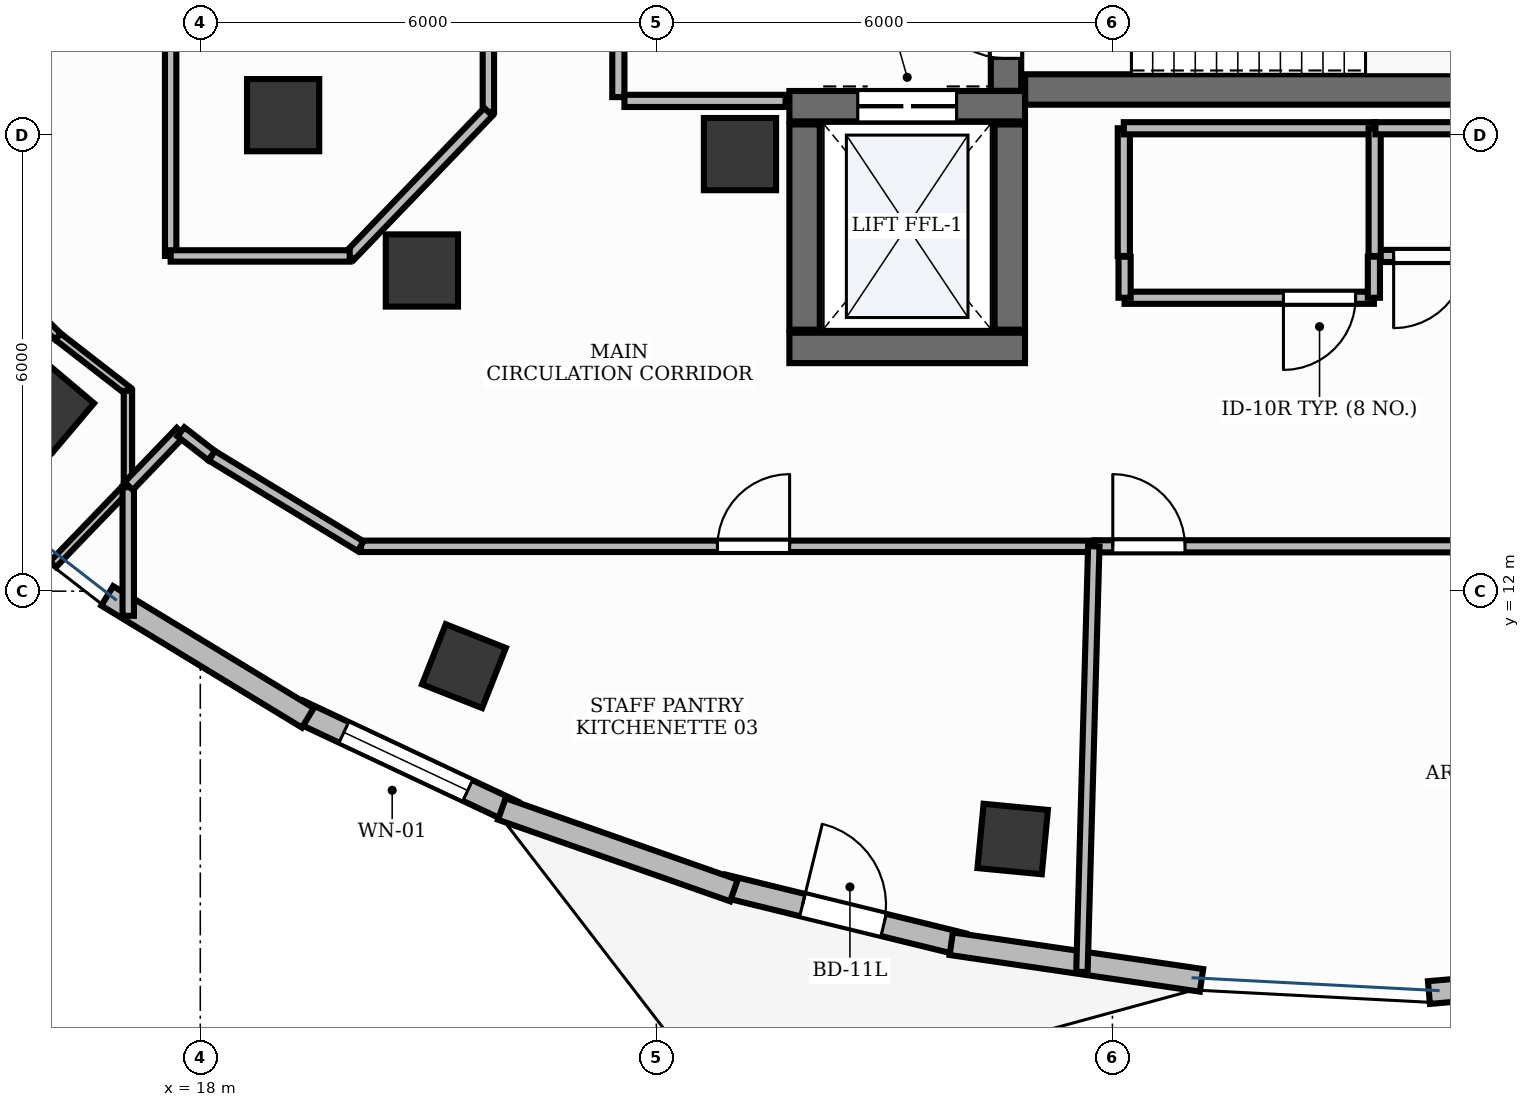
"""IFC4 building model, lengths in metres.
Left out: names, types, materials, properties, quantities, classifications, styles, units other than length and angle.
Written with IfcOpenShell. Run it as: python <this file> out.ifc"""

import sys

from ifc_helpers import new_model, si_unit, direction, frame, frame_2d, origin, origin_2d, place, context, subcontext, project, spatial, rectangle, extrude, element, fill, save


model = new_model("IFC4")
c1 = context("Model", 3, precision=1e-05, world=origin(), true_north=direction((0.0, 1.0)))
c2 = subcontext(c1, "Body", "Model", "MODEL_VIEW")
j1 = project(units=[si_unit("LENGTHUNIT", "METRE"), si_unit("PLANEANGLEUNIT", "RADIAN")], contexts=[c1])
p1 = place(None, origin())
s1 = spatial("IfcSite", under=j1, at=p1, CompositionType="ELEMENT")
p2 = place(p1, origin())
s2 = spatial("IfcBuilding", under=s1, at=p2, CompositionType="ELEMENT")
p3 = place(p2, frame((0.0, 0.0, 264.6)))
s3 = spatial("IfcBuildingStorey", under=s2, at=p3, CompositionType="ELEMENT", Elevation=264.6)
p4 = place(p3, frame((28.852, 18.6, 0.0), z_axis=(0.0, 0.0, 1.0), x_axis=(1.0, 0.0, 0.0)))
e1 = element("IfcWall", 1, at=p4, inside=s3, PredefinedType="SHEAR", context=c2, shape_type="SweptSolid", body=[
    extrude(rectangle(XDim=8.198, YDim=0.4, at=frame_2d((4.099, 0.0))), origin(), (0.0, 0.0, 1.0), 3.9),
])
p5 = place(p3, frame((28.6, 18.582, 0.0), z_axis=(0.0, 0.0, 1.0), x_axis=(0.0, 1.0, 0.0)))
e2 = element("IfcWall", 2, at=p5, inside=s3, PredefinedType="SHEAR", context=c2, shape_type="SweptSolid", body=[
    extrude(rectangle(XDim=3.308, YDim=0.4, at=frame_2d((1.654, 0.0))), origin(), (0.0, 0.0, 1.0), 3.9),
])
p6 = place(p5, frame((0.428, 0.0, 0.0)))
e3 = element("IfcOpeningElement", 3, at=p6, cuts=e2, PredefinedType="OPENING", context=c2, shape_type="SweptSolid", body=[
    extrude(rectangle(XDim=1.05, YDim=2.15, at=frame_2d((0.525, 1.075))), frame((0.0, 0.215, 0.0), z_axis=(0.0, -1.0, 0.0), x_axis=(1.0, 0.0, 0.0)), (0.0, 0.0, 1.0), 0.43),
])
p7 = place(p3, frame((25.75, 15.2, 0.0), z_axis=(0.0, 0.0, 1.0), x_axis=(1.0, 0.0, 0.0)))
e4 = element("IfcWall", 4, at=p7, inside=s3, PredefinedType="SHEAR", context=c2, shape_type="SweptSolid", body=[
    extrude(rectangle(XDim=3.1, YDim=0.4, at=frame_2d((1.55, 0.0))), origin(), (0.0, 0.0, 1.0), 3.9),
])
p8 = place(p3, frame((25.75, 18.38, 0.0), z_axis=(0.0, 0.0, 1.0), x_axis=(1.0, 0.0, 0.0)))
e5 = element("IfcWall", 5, at=p8, inside=s3, PredefinedType="SHEAR", context=c2, shape_type="SweptSolid", body=[
    extrude(rectangle(XDim=3.1, YDim=0.4, at=frame_2d((1.55, 0.0))), origin(), (0.0, 0.0, 1.0), 3.9),
])
p9 = place(p8, frame((0.9, 0.0, 0.0)))
e6 = element("IfcOpeningElement", 6, at=p9, cuts=e5, PredefinedType="OPENING", context=c2, shape_type="SweptSolid", body=[
    extrude(rectangle(XDim=1.3, YDim=2.2, at=frame_2d((0.65, 1.1))), frame((0.0, 0.215, 0.0), z_axis=(0.0, -1.0, 0.0), x_axis=(1.0, 0.0, 0.0)), (0.0, 0.0, 1.0), 0.43),
])
for number, where, z_axis, x_axis in (
    (7, (25.95, 15.44, 0.0), (0.0, 0.0, 1.0), (0.0, 1.0, 0.0)),
    (8, (28.65, 15.44, 0.0), (0.0, 0.0, 1.0), (0.0, 1.0, 0.0)),
):
    element("IfcWall", number, at=place(p3, frame(where, z_axis=z_axis, x_axis=x_axis)), inside=s3, PredefinedType="SHEAR", context=c2, shape_type="SweptSolid", body=[
        extrude(rectangle(XDim=2.7, YDim=0.4, at=frame_2d((1.35, 0.0))), origin(), (0.0, 0.0, 1.0), 3.9),
    ])
p10 = place(p3, frame((25.1, 17.75, -0.0), z_axis=(0.0, 0.0, 1.0), x_axis=(1.0, 0.0, 0.0)))
e9 = element("IfcColumn", 9, at=p10, inside=s3, PredefinedType="PILASTER", context=c2, shape_type="SweptSolid", body=[
    extrude(rectangle(XDim=0.95, YDim=0.95, at=origin_2d()), origin(), (0.0, 0.0, 1.0), 3.901),
])
p11 = place(p3, frame((19.09, 18.262, -0.0), z_axis=(0.0, 0.0, 1.0), x_axis=(1.0, 0.0, 0.0)))
e10 = element("IfcColumn", 10, at=p11, inside=s3, PredefinedType="COLUMN", context=c2, shape_type="SweptSolid", body=[
    extrude(rectangle(XDim=0.95, YDim=0.95, at=origin_2d()), origin(), (0.0, 0.0, 1.0), 3.901),
])
p12 = place(p3, frame((16.003, 14.421, -0.0), z_axis=(0.0, 0.0, 1.0), x_axis=(-0.764246456939, 0.644924300253, 0.0)))
e11 = element("IfcColumn", 11, at=p12, inside=s3, PredefinedType="COLUMN", context=c2, shape_type="SweptSolid", body=[
    extrude(rectangle(XDim=0.85, YDim=0.85, at=origin_2d()), origin(), (0.0, 0.0, 1.0), 3.901),
])
p13 = place(p3, frame((20.915, 16.219, -0.0), z_axis=(0.0, 0.0, 1.0), x_axis=(1.0, 0.0, 0.0)))
e12 = element("IfcColumn", 12, at=p13, inside=s3, PredefinedType="COLUMN", context=c2, shape_type="SweptSolid", body=[
    extrude(rectangle(XDim=0.95, YDim=0.95, at=origin_2d()), origin(), (0.0, 0.0, 1.0), 3.901),
])
for number, where, z_axis, x_axis in (
    (13, (21.469, 11.014, -0.0), (0.0, 0.0, 1.0), (-0.93, 0.367, 0.0)),
    (14, (28.688, 8.739, -0.0), (0.0, 0.0, 1.0), (-0.995, 0.095, 0.0)),
):
    element("IfcColumn", number, at=place(p3, frame(where, z_axis=z_axis, x_axis=x_axis)), inside=s3, PredefinedType="COLUMN", context=c2, shape_type="SweptSolid", body=[
        extrude(rectangle(XDim=0.85, YDim=0.85, at=origin_2d()), origin(), (0.0, 0.0, 1.0), 3.901),
    ])
p14 = place(p3, frame((19.288, 10.426, 0.0), z_axis=(0.0, 0.0, 1.0), x_axis=(0.904969006582, -0.425477493089, 0.0)))
e15 = element("IfcWall", 15, at=p14, inside=s3, PredefinedType="STANDARD", context=c2, shape_type="SweptSolid", body=[
    extrude(rectangle(XDim=3.128, YDim=0.3, at=frame_2d((1.564, 0.0))), origin(), (0.0, 0.0, 1.0), 3.9),
])
p15 = place(p14, frame((0.664, 0.0, 0.9)))
e16 = element("IfcOpeningElement", 16, at=p15, cuts=e15, PredefinedType="OPENING", context=c2, shape_type="SweptSolid", body=[
    extrude(rectangle(XDim=1.8, YDim=2.1, at=frame_2d((0.9, 1.05))), frame((0.0, 0.165, 0.0), z_axis=(0.0, -1.0, 0.0), x_axis=(1.0, 0.0, 0.0)), (0.0, 0.0, 1.0), 0.33),
])
p16 = place(p3, frame((24.878, 8.126, 0.0), z_axis=(0.0, 0.0, 1.0), x_axis=(0.971310768778, -0.237813772636, 0.0)))
e17 = element("IfcWall", 17, at=p16, inside=s3, PredefinedType="STANDARD", context=c2, shape_type="SweptSolid", body=[
    extrude(rectangle(XDim=3.25, YDim=0.3, at=frame_2d((1.625, 0.0))), origin(), (0.0, 0.0, 1.0), 3.9),
])
p17 = place(p16, frame((1.075, 0.0, 0.0)))
e18 = element("IfcOpeningElement", 18, at=p17, cuts=e17, PredefinedType="OPENING", context=c2, shape_type="SweptSolid", body=[
    extrude(rectangle(XDim=1.1, YDim=2.15, at=frame_2d((0.55, 1.075))), frame((0.0, 0.165, 0.0), z_axis=(0.0, -1.0, 0.0), x_axis=(1.0, 0.0, 0.0)), (0.0, 0.0, 1.0), 0.33),
])
p18 = place(p3, frame((16.776, 11.938, 0.0), z_axis=(0.0, 0.0, 1.0), x_axis=(0.854500616392, -0.519450379329, 0.0)))
e19 = element("IfcWall", 19, at=p18, inside=s3, PredefinedType="STANDARD", context=c2, shape_type="SweptSolid", body=[
    extrude(rectangle(XDim=3.089, YDim=0.3, at=frame_2d((1.544, 0.0))), origin(), (0.0, 0.0, 1.0), 3.9),
])
p19 = place(p3, frame((21.967, 9.134, 0.0), z_axis=(0.0, 0.0, 1.0), x_axis=(0.943499035395, -0.331375270968, 0.0)))
e20 = element("IfcWall", 20, at=p19, inside=s3, PredefinedType="STANDARD", context=c2, shape_type="SweptSolid", body=[
    extrude(rectangle(XDim=3.236, YDim=0.3, at=frame_2d((1.618, 0.0))), origin(), (0.0, 0.0, 1.0), 3.9),
])
p20 = place(p3, frame((27.879, 7.362, 0.0), z_axis=(0.0, 0.0, 1.0), x_axis=(0.989457987501, -0.144820202219, 0.0)))
e21 = element("IfcWall", 21, at=p20, inside=s3, PredefinedType="STANDARD", context=c2, shape_type="SweptSolid", body=[
    extrude(rectangle(XDim=3.328, YDim=0.3, at=frame_2d((1.664, 0.0))), origin(), (0.0, 0.0, 1.0), 3.9),
])
p21 = place(p3, frame((34.164, 6.719, 0.0), z_axis=(0.0, 0.0, 1.0), x_axis=(0.996250708408, 0.086513155053, 0.0)))
e22 = element("IfcWall", 22, at=p21, inside=s3, PredefinedType="STANDARD", context=c2, shape_type="SweptSolid", body=[
    extrude(rectangle(XDim=6.513, YDim=0.3, at=frame_2d((3.257, 0.0))), origin(), (0.0, 0.0, 1.0), 3.9),
])
p22 = place(p3, frame((23.5, 18.5, 0.0), z_axis=(0.0, 0.0, 1.0), x_axis=(0.0, 1.0, 0.0)))
e23 = element("IfcWall", 23, at=p22, inside=s3, PredefinedType="PARTITIONING", context=c2, shape_type="SweptSolid", body=[
    extrude(rectangle(XDim=3.4, YDim=0.16, at=frame_2d((1.7, 0.0))), origin(), (0.0, 0.0, 1.0), 2.91),
])
p23 = place(p22, frame((1.175, 0.0, 0.0)))
e24 = element("IfcOpeningElement", 24, at=p23, cuts=e23, PredefinedType="OPENING", context=c2, shape_type="SweptSolid", body=[
    extrude(rectangle(XDim=1.05, YDim=2.15, at=frame_2d((0.525, 1.075))), frame((0.0, 0.095, 0.0), z_axis=(0.0, -1.0, 0.0), x_axis=(1.0, 0.0, 0.0)), (0.0, 0.0, 1.0), 0.19),
])
p24 = place(p3, frame((23.58, 18.45, 0.0), z_axis=(0.0, 0.0, 1.0), x_axis=(1.0, 0.0, 0.0)))
e25 = element("IfcWall", 25, at=p24, inside=s3, PredefinedType="PARTITIONING", context=c2, shape_type="SweptSolid", body=[
    extrude(rectangle(XDim=2.12, YDim=0.16, at=frame_2d((1.06, 0.0))), origin(), (0.0, 0.0, 1.0), 2.91),
])
p25 = place(p3, frame((33.44, 15.86, 0.0), z_axis=(0.0, 0.0, 1.0), x_axis=(-1.0, 0.0, 0.0)))
e26 = element("IfcWall", 26, at=p25, inside=s3, PredefinedType="PARTITIONING", context=c2, shape_type="SweptSolid", body=[
    extrude(rectangle(XDim=3.28, YDim=0.16, at=frame_2d((1.64, 0.0))), origin(), (0.0, 0.0, 1.0), 2.91),
])
p26 = place(p25, frame((0.24, 0.0, 0.0)))
e27 = element("IfcOpeningElement", 27, at=p26, cuts=e26, PredefinedType="OPENING", context=c2, shape_type="SweptSolid", body=[
    extrude(rectangle(XDim=0.95, YDim=2.15, at=frame_2d((0.475, 1.075))), frame((0.0, 0.095, 0.0), z_axis=(0.0, -1.0, 0.0), x_axis=(1.0, 0.0, 0.0)), (0.0, 0.0, 1.0), 0.19),
])
p27 = place(p3, frame((17.61, 16.41, 0.0), z_axis=(0.0, 0.0, 1.0), x_axis=(0.0, 1.0, 0.0)))
e28 = element("IfcWall", 28, at=p27, inside=s3, PredefinedType="PARTITIONING", context=c2, shape_type="SweptSolid", body=[
    extrude(rectangle(XDim=8.353, YDim=0.15, at=frame_2d((4.176, 0.0))), origin(), (0.0, 0.0, 1.0), 2.91),
])
p28 = place(p27, frame((5.371, 0.0, 0.0)))
e29 = element("IfcOpeningElement", 29, at=p28, cuts=e28, PredefinedType="OPENING", context=c2, shape_type="SweptSolid", body=[
    extrude(rectangle(XDim=0.95, YDim=2.15, at=frame_2d((0.475, 1.075))), frame((0.0, 0.09, 0.0), z_axis=(0.0, -1.0, 0.0), x_axis=(1.0, 0.0, 0.0)), (0.0, 0.0, 1.0), 0.18),
])
p29 = place(p3, frame((20.114, 12.59, 0.0), z_axis=(0.0, 0.0, 1.0), x_axis=(1.0, 0.0, 0.0)))
e30 = element("IfcWall", 30, at=p29, inside=s3, PredefinedType="PARTITIONING", context=c2, shape_type="SweptSolid", body=[
    extrude(rectangle(XDim=9.641, YDim=0.15, at=frame_2d((4.82, 0.0))), origin(), (0.0, 0.0, 1.0), 2.91),
])
p30 = place(p29, frame((4.689, 0.0, 0.0)))
e31 = element("IfcOpeningElement", 31, at=p30, cuts=e30, PredefinedType="OPENING", context=c2, shape_type="SweptSolid", body=[
    extrude(rectangle(XDim=0.95, YDim=2.15, at=frame_2d((0.475, 1.075))), frame((0.0, 0.09, 0.0), z_axis=(0.0, -1.0, 0.0), x_axis=(1.0, 0.0, 0.0)), (0.0, 0.0, 1.0), 0.18),
])
p31 = place(p3, frame((29.765, 12.59, 0.0), z_axis=(0.0, 0.0, 1.0), x_axis=(1.0, 0.0, 0.0)))
e32 = element("IfcWall", 32, at=p31, inside=s3, PredefinedType="PARTITIONING", context=c2, shape_type="SweptSolid", body=[
    extrude(rectangle(XDim=11.533, YDim=0.16, at=frame_2d((5.767, 0.0))), origin(), (0.0, 0.0, 1.0), 2.91),
])
p32 = place(p31, frame((0.24, 0.0, 0.0)))
e33 = element("IfcOpeningElement", 33, at=p32, cuts=e32, PredefinedType="OPENING", context=c2, shape_type="SweptSolid", body=[
    extrude(rectangle(XDim=0.95, YDim=2.15, at=frame_2d((0.475, 1.075))), frame((0.0, 0.095, 0.0), z_axis=(0.0, -1.0, 0.0), x_axis=(1.0, 0.0, 0.0)), (0.0, 0.0, 1.0), 0.19),
])
p33 = place(p3, frame((41.298, 16.41, 0.0), z_axis=(0.0, 0.0, 1.0), x_axis=(-1.0, 0.0, 0.0)))
e34 = element("IfcWall", 34, at=p33, inside=s3, PredefinedType="PARTITIONING", context=c2, shape_type="SweptSolid", body=[
    extrude(rectangle(XDim=7.838, YDim=0.16, at=frame_2d((3.919, 0.0))), origin(), (0.0, 0.0, 1.0), 2.91),
])
p34 = place(p33, frame((6.648, 0.0, 0.0)))
e35 = element("IfcOpeningElement", 35, at=p34, cuts=e34, PredefinedType="OPENING", context=c2, shape_type="SweptSolid", body=[
    extrude(rectangle(XDim=0.95, YDim=2.15, at=frame_2d((0.475, 1.075))), frame((0.0, 0.095, 0.0), z_axis=(0.0, -1.0, 0.0), x_axis=(1.0, 0.0, 0.0)), (0.0, 0.0, 1.0), 0.19),
])
for number, where, z_axis, x_axis in (
    (36, (33.44, 16.4, 0.0), (0.0, 0.0, 1.0), (0.0, -1.0, 0.0)),
    (37, (30.16, 15.86, 0.0), (0.0, 0.0, 1.0), (0.0, 1.0, 0.0)),
):
    element("IfcWall", number, at=place(p3, frame(where, z_axis=z_axis, x_axis=x_axis)), inside=s3, PredefinedType="PARTITIONING", context=c2, shape_type="SweptSolid", body=[
        extrude(rectangle(XDim=0.54, YDim=0.16, at=frame_2d((0.27, 0.0))), origin(), (0.0, 0.0, 1.0), 2.91),
    ])
p35 = place(p3, frame((30.15, 16.41, 0.0), z_axis=(0.0, 0.0, 1.0), x_axis=(0.0, 1.0, 0.0)))
e38 = element("IfcWall", 38, at=p35, inside=s3, PredefinedType="PARTITIONING", context=c2, shape_type="SweptSolid", body=[
    extrude(rectangle(XDim=1.68, YDim=0.16, at=frame_2d((0.84, 0.0))), origin(), (0.0, 0.0, 1.0), 2.91),
])
p36 = place(p3, frame((30.15, 18.09, 0.0), z_axis=(0.0, 0.0, 1.0), x_axis=(1.0, 0.0, 0.0)))
e39 = element("IfcWall", 39, at=p36, inside=s3, PredefinedType="PARTITIONING", context=c2, shape_type="SweptSolid", body=[
    extrude(rectangle(XDim=3.3, YDim=0.16, at=frame_2d((1.65, 0.0))), origin(), (0.0, 0.0, 1.0), 2.91),
])
p37 = place(p3, frame((33.45, 18.09, 0.0), z_axis=(0.0, 0.0, 1.0), x_axis=(0.0, -1.0, 0.0)))
e40 = element("IfcWall", 40, at=p37, inside=s3, PredefinedType="PARTITIONING", context=c2, shape_type="SweptSolid", body=[
    extrude(rectangle(XDim=1.68, YDim=0.16, at=frame_2d((0.84, 0.0))), origin(), (0.0, 0.0, 1.0), 2.91),
])
p38 = place(p3, frame((14.384, 17.073, 0.0), z_axis=(0.0, 0.0, 1.0), x_axis=(0.711327015195, -0.702861207817, 0.0)))
e41 = element("IfcWall", 41, at=p38, inside=s3, PredefinedType="MOVABLE", context=c2, shape_type="SweptSolid", body=[
    extrude(rectangle(XDim=2.451, YDim=0.11, at=frame_2d((1.226, 0.0))), origin(), (0.0, 0.0, 1.0), 2.91),
])
p39 = place(p3, frame((16.128, 15.349, 0.0), z_axis=(0.0, 0.0, 1.0), x_axis=(0.790536936783, -0.612414362651, 0.0)))
e42 = element("IfcWall", 42, at=p39, inside=s3, PredefinedType="MOVABLE", context=c2, shape_type="SweptSolid", body=[
    extrude(rectangle(XDim=1.164, YDim=0.11, at=frame_2d((0.582, 0.0))), origin(), (0.0, 0.0, 1.0), 2.91),
])
p40 = place(p3, frame((17.048, 14.636, 0.0), z_axis=(0.0, 0.0, 1.0), x_axis=(0.0, -1.0, 0.0)))
e43 = element("IfcWall", 43, at=p40, inside=s3, PredefinedType="MOVABLE", context=c2, shape_type="SweptSolid", body=[
    extrude(rectangle(XDim=1.258, YDim=0.11, at=frame_2d((0.629, 0.0))), origin(), (0.0, 0.0, 1.0), 2.91),
])
p41 = place(p3, frame((17.048, 13.378, 0.0), z_axis=(0.0, 0.0, 1.0), x_axis=(-0.693410652624, -0.720542619716, 0.0)))
e44 = element("IfcWall", 44, at=p41, inside=s3, PredefinedType="MOVABLE", context=c2, shape_type="SweptSolid", body=[
    extrude(rectangle(XDim=1.422, YDim=0.11, at=frame_2d((0.711, 0.0))), origin(), (0.0, 0.0, 1.0), 2.91),
])
p42 = place(p3, frame((21.79, 21.44, 0.0), z_axis=(0.0, 0.0, 1.0), x_axis=(0.0, -1.0, 0.0)))
e45 = element("IfcWall", 45, at=p42, inside=s3, PredefinedType="PARTITIONING", context=c2, shape_type="SweptSolid", body=[
    extrude(rectangle(XDim=3.134, YDim=0.15, at=frame_2d((1.567, 0.0))), origin(), (0.0, 0.0, 1.0), 2.91),
])
p43 = place(p3, frame((21.79, 18.306, 0.0), z_axis=(0.0, 0.0, 1.0), x_axis=(-0.693381280986, -0.720570884215, 0.0)))
e46 = element("IfcWall", 46, at=p43, inside=s3, PredefinedType="PARTITIONING", context=c2, shape_type="SweptSolid", body=[
    extrude(rectangle(XDim=2.631, YDim=0.15, at=frame_2d((1.315, 0.0))), origin(), (0.0, 0.0, 1.0), 2.91),
])
p44 = place(p3, frame((19.966, 16.41, 0.0), z_axis=(0.0, 0.0, 1.0), x_axis=(-1.0, 0.0, 0.0)))
e47 = element("IfcWall", 47, at=p44, inside=s3, PredefinedType="PARTITIONING", context=c2, shape_type="SweptSolid", body=[
    extrude(rectangle(XDim=2.356, YDim=0.15, at=frame_2d((1.178, 0.0))), origin(), (0.0, 0.0, 1.0), 2.91),
])
p45 = place(p3, frame((17.052, 11.675, 0.0), z_axis=(0.0, 0.0, 1.0), x_axis=(0.0, 1.0, 0.0)))
e48 = element("IfcWall", 48, at=p45, inside=s3, PredefinedType="PARTITIONING", context=c2, shape_type="SweptSolid", body=[
    extrude(rectangle(XDim=1.693, YDim=0.15, at=frame_2d((0.846, 0.0))), origin(), (0.0, 0.0, 1.0), 2.91),
])
p46 = place(p3, frame((17.058, 13.383, 0.0), z_axis=(0.0, 0.0, 1.0), x_axis=(0.693419009771, 0.720534577163, 0.0)))
e49 = element("IfcWall", 49, at=p46, inside=s3, PredefinedType="PARTITIONING", context=c2, shape_type="SweptSolid", body=[
    extrude(rectangle(XDim=0.99, YDim=0.15, at=frame_2d((0.495, 0.0))), origin(), (0.0, 0.0, 1.0), 2.91),
])
p47 = place(p3, frame((17.745, 14.096, 0.0), z_axis=(0.0, 0.0, 1.0), x_axis=(0.790478415243, -0.612489897904, 0.0)))
e50 = element("IfcWall", 50, at=p47, inside=s3, PredefinedType="PARTITIONING", context=c2, shape_type="SweptSolid", body=[
    extrude(rectangle(XDim=0.513, YDim=0.15, at=frame_2d((0.256, 0.0))), origin(), (0.0, 0.0, 1.0), 2.91),
])
p48 = place(p3, frame((18.151, 13.781, 0.0), z_axis=(0.0, 0.0, 1.0), x_axis=(0.854507101003, -0.519439711935, 0.0)))
e51 = element("IfcWall", 51, at=p48, inside=s3, PredefinedType="PARTITIONING", context=c2, shape_type="SweptSolid", body=[
    extrude(rectangle(XDim=2.291, YDim=0.15, at=frame_2d((1.146, 0.0))), origin(), (0.0, 0.0, 1.0), 2.91),
])
p49 = place(p3, frame((29.755, 12.59, 0.0), z_axis=(0.0, 0.0, 1.0), x_axis=(-0.02789409051, -0.999610884152, 0.0)))
e52 = element("IfcWall", 52, at=p49, inside=s3, PredefinedType="PARTITIONING", context=c2, shape_type="SweptSolid", body=[
    extrude(rectangle(XDim=5.602, YDim=0.15, at=frame_2d((2.801, 0.0))), origin(), (0.0, 0.0, 1.0), 2.91),
])
p50 = place(p3, frame((33.46, 18.09, 0.0), z_axis=(0.0, 0.0, 1.0), x_axis=(1.0, 0.0, 0.0)))
e53 = element("IfcWall", 53, at=p50, inside=s3, PredefinedType="PARTITIONING", context=c2, shape_type="SweptSolid", body=[
    extrude(rectangle(XDim=3.89, YDim=0.16, at=frame_2d((1.945, 0.0))), origin(), (0.0, 0.0, 1.0), 2.91),
])
p51 = place(p15, origin())
e54 = element("IfcWindow", 54, at=p51, inside=s3, PartitioningType="SINGLE_PANEL", PredefinedType="WINDOW", context=c2, shape_type="SweptSolid", body=[
    extrude(rectangle(XDim=1.8, YDim=2.1, at=frame_2d((0.9, 1.05))), frame((0.0, 0.03, 0.0), z_axis=(0.0, -1.0, 0.0), x_axis=(1.0, 0.0, 0.0)), (0.0, 0.0, 1.0), 0.06),
])
fill(e16, e54)
p52 = place(p17, origin())
e55 = element("IfcDoor", 55, at=p52, inside=s3, OperationType="SINGLE_SWING_LEFT", PredefinedType="DOOR", context=c2, shape_type="SweptSolid", body=[
    extrude(rectangle(XDim=1.1, YDim=2.15, at=frame_2d((0.55, 1.075))), frame((0.0, 0.025, 0.0), z_axis=(0.0, -1.0, 0.0), x_axis=(1.0, 0.0, 0.0)), (0.0, 0.0, 1.0), 0.05),
])
fill(e18, e55)
p53 = place(p6, origin())
e56 = element("IfcDoor", 56, at=p53, inside=s3, OperationType="SINGLE_SWING_RIGHT", PredefinedType="DOOR", context=c2, shape_type="SweptSolid", body=[
    extrude(rectangle(XDim=1.05, YDim=2.15, at=frame_2d((0.525, 1.075))), frame((0.0, 0.025, 0.0), z_axis=(0.0, -1.0, 0.0), x_axis=(1.0, 0.0, 0.0)), (0.0, 0.0, 1.0), 0.05),
])
fill(e3, e56)
p54 = place(p9, origin())
e57 = element("IfcDoor", 57, at=p54, inside=s3, OperationType="DOUBLE_DOOR_SLIDING", PredefinedType="DOOR", context=c2, shape_type="SweptSolid", body=[
    extrude(rectangle(XDim=1.3, YDim=2.2, at=frame_2d((0.65, 1.1))), frame((0.0, 0.025, 0.0), z_axis=(0.0, -1.0, 0.0), x_axis=(1.0, 0.0, 0.0)), (0.0, 0.0, 1.0), 0.05),
])
fill(e6, e57)
p55 = place(p26, origin())
e58 = element("IfcDoor", 58, at=p55, inside=s3, OperationType="SINGLE_SWING_RIGHT", PredefinedType="DOOR", context=c2, shape_type="SweptSolid", body=[
    extrude(rectangle(XDim=0.95, YDim=2.15, at=frame_2d((0.475, 1.075))), frame((0.0, 0.025, 0.0), z_axis=(0.0, -1.0, 0.0), x_axis=(1.0, 0.0, 0.0)), (0.0, 0.0, 1.0), 0.05),
])
fill(e27, e58)
p56 = place(p30, origin())
e59 = element("IfcDoor", 59, at=p56, inside=s3, OperationType="SINGLE_SWING_RIGHT", PredefinedType="DOOR", context=c2, shape_type="SweptSolid", body=[
    extrude(rectangle(XDim=0.95, YDim=2.15, at=frame_2d((0.475, 1.075))), frame((0.0, 0.025, 0.0), z_axis=(0.0, -1.0, 0.0), x_axis=(1.0, 0.0, 0.0)), (0.0, 0.0, 1.0), 0.05),
])
fill(e31, e59)
p57 = place(p32, origin())
e60 = element("IfcDoor", 60, at=p57, inside=s3, OperationType="SINGLE_SWING_LEFT", PredefinedType="DOOR", context=c2, shape_type="SweptSolid", body=[
    extrude(rectangle(XDim=0.95, YDim=2.15, at=frame_2d((0.475, 1.075))), frame((0.0, 0.025, 0.0), z_axis=(0.0, -1.0, 0.0), x_axis=(1.0, 0.0, 0.0)), (0.0, 0.0, 1.0), 0.05),
])
fill(e33, e60)
p58 = place(p34, origin())
e61 = element("IfcDoor", 61, at=p58, inside=s3, OperationType="SINGLE_SWING_RIGHT", PredefinedType="DOOR", context=c2, shape_type="SweptSolid", body=[
    extrude(rectangle(XDim=0.95, YDim=2.15, at=frame_2d((0.475, 1.075))), frame((0.0, 0.025, 0.0), z_axis=(0.0, -1.0, 0.0), x_axis=(1.0, 0.0, 0.0)), (0.0, 0.0, 1.0), 0.05),
])
fill(e35, e61)
save(model, sys.argv[1])
